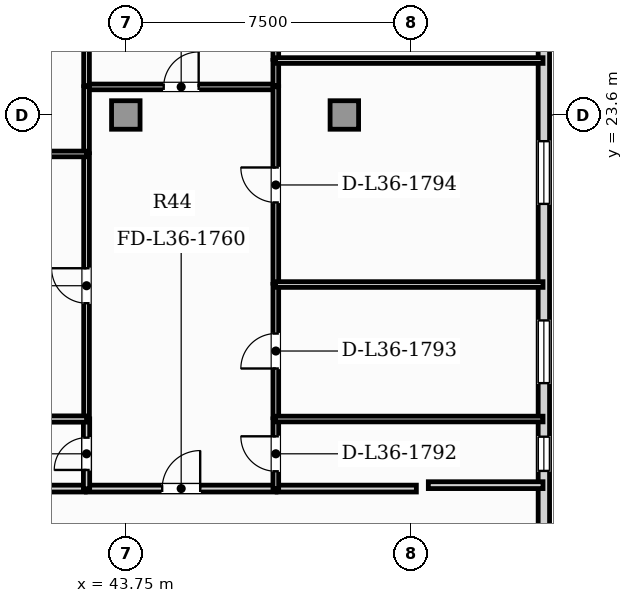
"""IFC4 building model, lengths in metres.
Left out: names, types, materials, properties, quantities, classifications, styles, units other than length and angle.
Written with IfcOpenShell. Run it as: python <this file> out.ifc"""

import sys

from ifc_helpers import new_model, si_unit, direction, frame, frame_2d, origin, origin_2d, place, context, subcontext, project, spatial, rectangle, extrude, element, fill, save


model = new_model("IFC4")
c1 = context("Model", 3, precision=1e-05, world=origin(), true_north=direction((0.0, 1.0)))
c2 = subcontext(c1, "Body", "Model", "MODEL_VIEW")
j1 = project(units=[si_unit("LENGTHUNIT", "METRE"), si_unit("PLANEANGLEUNIT", "RADIAN")], contexts=[c1])
p1 = place(None, origin())
s1 = spatial("IfcSite", under=j1, at=p1, CompositionType="ELEMENT")
p2 = place(p1, origin())
s2 = spatial("IfcBuilding", under=s1, at=p2, CompositionType="ELEMENT")
p3 = place(p2, frame((0.0, 0.0, 149.05)))
s3 = spatial("IfcBuildingStorey", under=s2, at=p3, CompositionType="ELEMENT", Elevation=149.05)
for number, where, z_axis, x_axis in (
    (1, (43.75, 23.6, 0.0), (0.0, 0.0, 1.0), (1.0, 0.0, 0.0)),
    (2, (49.5, 23.6, 0.0), (0.0, 0.0, 1.0), (1.0, 0.0, 0.0)),
):
    element("IfcColumn", number, at=place(p3, frame(where, z_axis=z_axis, x_axis=x_axis)), inside=s3, PredefinedType="COLUMN", context=c2, shape_type="SweptSolid", body=[
        extrude(rectangle(XDim=0.75, YDim=0.75, at=origin_2d()), origin(), (0.0, 0.0, 1.0), 3.85),
    ])
p4 = place(p3, frame((54.75, 3.24, 0.0), z_axis=(0.0, 0.0, 1.0), x_axis=(0.0, 1.0, 0.0)))
e3 = element("IfcWall", 3, at=p4, inside=s3, PredefinedType="SOLIDWALL", context=c2, shape_type="SweptSolid", body=[
    extrude(rectangle(XDim=36.72, YDim=0.3, at=frame_2d((18.36, 0.0))), origin(), (0.0, 0.0, 1.0), 3.63),
])
p5 = place(p4, frame((30.56, 0.0, 0.95)))
e4 = element("IfcOpeningElement", 4, at=p5, cuts=e3, PredefinedType="OPENING", context=c2, shape_type="SweptSolid", body=[
    extrude(rectangle(XDim=0.9, YDim=1.5, at=frame_2d((0.45, 0.75))), frame((0.0, 0.16, 0.0), z_axis=(0.0, -1.0, 0.0), x_axis=(1.0, 0.0, 0.0)), (0.0, 0.0, 1.0), 0.32),
])
p6 = place(p4, frame((10.995, 0.0, 0.95)))
e5 = element("IfcOpeningElement", 5, at=p6, cuts=e3, PredefinedType="OPENING", context=c2, shape_type="SweptSolid", body=[
    extrude(rectangle(XDim=0.9, YDim=1.5, at=frame_2d((0.45, 0.75))), frame((0.0, 0.16, 0.0), z_axis=(0.0, -1.0, 0.0), x_axis=(1.0, 0.0, 0.0)), (0.0, 0.0, 1.0), 0.32),
])
p7 = place(p4, frame((13.304, 0.0, 0.88)))
e6 = element("IfcOpeningElement", 6, at=p7, cuts=e3, PredefinedType="OPENING", context=c2, shape_type="SweptSolid", body=[
    extrude(rectangle(XDim=1.65, YDim=2.0, at=frame_2d((0.825, 1.0))), frame((0.0, 0.16, 0.0), z_axis=(0.0, -1.0, 0.0), x_axis=(1.0, 0.0, 0.0)), (0.0, 0.0, 1.0), 0.32),
])
p8 = place(p4, frame((18.021, 0.0, 0.88)))
e7 = element("IfcOpeningElement", 7, at=p8, cuts=e3, PredefinedType="OPENING", context=c2, shape_type="SweptSolid", body=[
    extrude(rectangle(XDim=1.65, YDim=2.0, at=frame_2d((0.825, 1.0))), frame((0.0, 0.16, 0.0), z_axis=(0.0, -1.0, 0.0), x_axis=(1.0, 0.0, 0.0)), (0.0, 0.0, 1.0), 0.32),
])
p9 = place(p4, frame((25.201, 0.0, 0.88)))
e8 = element("IfcOpeningElement", 8, at=p9, cuts=e3, PredefinedType="OPENING", context=c2, shape_type="SweptSolid", body=[
    extrude(rectangle(XDim=1.65, YDim=2.0, at=frame_2d((0.825, 1.0))), frame((0.0, 0.16, 0.0), z_axis=(0.0, -1.0, 0.0), x_axis=(1.0, 0.0, 0.0)), (0.0, 0.0, 1.0), 0.32),
])
p10 = place(p4, frame((32.759, 0.0, 0.88)))
e9 = element("IfcOpeningElement", 9, at=p10, cuts=e3, PredefinedType="OPENING", context=c2, shape_type="SweptSolid", body=[
    extrude(rectangle(XDim=1.65, YDim=2.0, at=frame_2d((0.825, 1.0))), frame((0.0, 0.16, 0.0), z_axis=(0.0, -1.0, 0.0), x_axis=(1.0, 0.0, 0.0)), (0.0, 0.0, 1.0), 0.32),
])
p11 = place(p3, frame((42.712, 13.77, 0.0), z_axis=(0.0, 0.0, 1.0), x_axis=(1.0, 0.0, 0.0)))
e10 = element("IfcWall", 10, at=p11, inside=s3, PredefinedType="PARTITIONING", context=c2, shape_type="SweptSolid", body=[
    extrude(rectangle(XDim=4.99, YDim=0.18, at=frame_2d((2.495, 0.0))), origin(), (0.0, 0.0, 1.0), 3.63),
])
p12 = place(p11, frame((1.995, 0.0, 0.0)))
e11 = element("IfcOpeningElement", 11, at=p12, cuts=e10, PredefinedType="OPENING", context=c2, shape_type="SweptSolid", body=[
    extrude(rectangle(XDim=1.0, YDim=2.15, at=frame_2d((0.5, 1.075))), frame((0.0, 0.1, 0.0), z_axis=(0.0, -1.0, 0.0), x_axis=(1.0, 0.0, 0.0)), (0.0, 0.0, 1.0), 0.2),
])
p13 = place(p3, frame((36.379, 13.77, 0.0), z_axis=(0.0, 0.0, 1.0), x_axis=(1.0, 0.0, 0.0)))
e12 = element("IfcWall", 12, at=p13, inside=s3, PredefinedType="PARTITIONING", context=c2, shape_type="SweptSolid", body=[
    extrude(rectangle(XDim=6.303, YDim=0.18, at=frame_2d((3.151, 0.0))), origin(), (0.0, 0.0, 1.0), 3.63),
])
p14 = place(p3, frame((47.732, 13.77, 0.0), z_axis=(0.0, 0.0, 1.0), x_axis=(1.0, 0.0, 0.0)))
e13 = element("IfcWall", 13, at=p14, inside=s3, PredefinedType="PARTITIONING", context=c2, shape_type="SweptSolid", body=[
    extrude(rectangle(XDim=3.663, YDim=0.18, at=frame_2d((1.832, 0.0))), origin(), (0.0, 0.0, 1.0), 3.63),
])
p15 = place(p3, frame((42.712, 24.338, 0.0), z_axis=(0.0, 0.0, 1.0), x_axis=(1.0, 0.0, 0.0)))
e14 = element("IfcWall", 14, at=p15, inside=s3, PredefinedType="PARTITIONING", context=c2, shape_type="SweptSolid", body=[
    extrude(rectangle(XDim=4.99, YDim=0.15, at=frame_2d((2.495, 0.0))), origin(), (0.0, 0.0, 1.0), 3.63),
])
p16 = place(p15, frame((2.035, 0.0, 0.0)))
e15 = element("IfcOpeningElement", 15, at=p16, cuts=e14, PredefinedType="OPENING", context=c2, shape_type="SweptSolid", body=[
    extrude(rectangle(XDim=0.92, YDim=2.1, at=frame_2d((0.46, 1.05))), frame((0.0, 0.085, 0.0), z_axis=(0.0, -1.0, 0.0), x_axis=(1.0, 0.0, 0.0)), (0.0, 0.0, 1.0), 0.17),
])
p17 = place(p3, frame((42.717, 13.765, 0.0), z_axis=(0.0, 0.0, 1.0), x_axis=(0.0, 1.0, 0.0)))
e16 = element("IfcWall", 16, at=p17, inside=s3, PredefinedType="PLUMBINGWALL", context=c2, shape_type="SweptSolid", body=[
    extrude(rectangle(XDim=1.84, YDim=0.165, at=frame_2d((0.92, 0.0))), origin(), (0.0, 0.0, 1.0), 3.63),
])
p18 = place(p17, frame((0.495, 0.0, 0.0)))
e17 = element("IfcOpeningElement", 17, at=p18, cuts=e16, PredefinedType="OPENING", context=c2, shape_type="SweptSolid", body=[
    extrude(rectangle(XDim=0.85, YDim=2.1, at=frame_2d((0.425, 1.05))), frame((0.0, 0.093, 0.0), z_axis=(0.0, -1.0, 0.0), x_axis=(1.0, 0.0, 0.0)), (0.0, 0.0, 1.0), 0.185),
])
p19 = place(p3, frame((42.717, 15.635, 0.0), z_axis=(0.0, 0.0, 1.0), x_axis=(0.0, 1.0, 0.0)))
e18 = element("IfcWall", 18, at=p19, inside=s3, PredefinedType="PARTITIONING", context=c2, shape_type="SweptSolid", body=[
    extrude(rectangle(XDim=6.945, YDim=0.15, at=frame_2d((3.472, 0.0))), origin(), (0.0, 0.0, 1.0), 3.63),
])
p20 = place(p19, frame((3.012, 0.0, 0.0)))
e19 = element("IfcOpeningElement", 19, at=p20, cuts=e18, PredefinedType="OPENING", context=c2, shape_type="SweptSolid", body=[
    extrude(rectangle(XDim=0.92, YDim=2.1, at=frame_2d((0.46, 1.05))), frame((0.0, 0.085, 0.0), z_axis=(0.0, -1.0, 0.0), x_axis=(1.0, 0.0, 0.0)), (0.0, 0.0, 1.0), 0.17),
])
p21 = place(p3, frame((42.717, 22.61, 0.0), z_axis=(0.0, 0.0, 1.0), x_axis=(0.0, 1.0, 0.0)))
e20 = element("IfcWall", 20, at=p21, inside=s3, PredefinedType="PARTITIONING", context=c2, shape_type="SweptSolid", body=[
    extrude(rectangle(XDim=1.734, YDim=0.15, at=frame_2d((0.867, 0.0))), origin(), (0.0, 0.0, 1.0), 3.63),
])
p22 = place(p3, frame((47.697, 13.765, 0.0), z_axis=(0.0, 0.0, 1.0), x_axis=(0.0, 1.0, 0.0)))
e21 = element("IfcWall", 21, at=p22, inside=s3, PredefinedType="PARTITIONING", context=c2, shape_type="SweptSolid", body=[
    extrude(rectangle(XDim=1.84, YDim=0.15, at=frame_2d((0.92, 0.0))), origin(), (0.0, 0.0, 1.0), 3.63),
])
p23 = place(p22, frame((0.46, 0.0, 0.0)))
e22 = element("IfcOpeningElement", 22, at=p23, cuts=e21, PredefinedType="OPENING", context=c2, shape_type="SweptSolid", body=[
    extrude(rectangle(XDim=0.92, YDim=2.1, at=frame_2d((0.46, 1.05))), frame((0.0, 0.085, 0.0), z_axis=(0.0, -1.0, 0.0), x_axis=(1.0, 0.0, 0.0)), (0.0, 0.0, 1.0), 0.17),
])
p24 = place(p3, frame((47.697, 15.635, 0.0), z_axis=(0.0, 0.0, 1.0), x_axis=(0.0, 1.0, 0.0)))
e23 = element("IfcWall", 23, at=p24, inside=s3, PredefinedType="PARTITIONING", context=c2, shape_type="SweptSolid", body=[
    extrude(rectangle(XDim=3.509, YDim=0.15, at=frame_2d((1.754, 0.0))), origin(), (0.0, 0.0, 1.0), 3.177),
])
p25 = place(p24, frame((1.294, 0.0, 0.0)))
e24 = element("IfcOpeningElement", 24, at=p25, cuts=e23, PredefinedType="OPENING", context=c2, shape_type="SweptSolid", body=[
    extrude(rectangle(XDim=0.92, YDim=2.1, at=frame_2d((0.46, 1.05))), frame((0.0, 0.085, 0.0), z_axis=(0.0, -1.0, 0.0), x_axis=(1.0, 0.0, 0.0)), (0.0, 0.0, 1.0), 0.17),
])
p26 = place(p3, frame((47.697, 19.174, 0.0), z_axis=(0.0, 0.0, 1.0), x_axis=(0.0, 1.0, 0.0)))
e25 = element("IfcWall", 25, at=p26, inside=s3, PredefinedType="PARTITIONING", context=c2, shape_type="SweptSolid", body=[
    extrude(rectangle(XDim=5.17, YDim=0.15, at=frame_2d((2.585, 0.0))), origin(), (0.0, 0.0, 1.0), 3.177),
])
p27 = place(p26, frame((2.125, 0.0, 0.0)))
e26 = element("IfcOpeningElement", 26, at=p27, cuts=e25, PredefinedType="OPENING", context=c2, shape_type="SweptSolid", body=[
    extrude(rectangle(XDim=0.92, YDim=2.1, at=frame_2d((0.46, 1.05))), frame((0.0, 0.085, 0.0), z_axis=(0.0, -1.0, 0.0), x_axis=(1.0, 0.0, 0.0)), (0.0, 0.0, 1.0), 0.17),
])
p28 = place(p3, frame((42.717, 24.374, 0.0), z_axis=(0.0, 0.0, 1.0), x_axis=(0.0, 1.0, 0.0)))
e27 = element("IfcWall", 27, at=p28, inside=s3, PredefinedType="PARTITIONING", context=c2, shape_type="SweptSolid", body=[
    extrude(rectangle(XDim=9.131, YDim=0.15, at=frame_2d((4.566, 0.0))), origin(), (0.0, 0.0, 1.0), 3.63),
])
p29 = place(p28, frame((5.476, 0.0, 0.0)))
e28 = element("IfcOpeningElement", 28, at=p29, cuts=e27, PredefinedType="OPENING", context=c2, shape_type="SweptSolid", body=[
    extrude(rectangle(XDim=0.92, YDim=2.1, at=frame_2d((0.46, 1.05))), frame((0.0, 0.085, 0.0), z_axis=(0.0, -1.0, 0.0), x_axis=(1.0, 0.0, 0.0)), (0.0, 0.0, 1.0), 0.17),
])
p30 = place(p3, frame((47.697, 24.374, 0.0), z_axis=(0.0, 0.0, 1.0), x_axis=(0.0, 1.0, 0.0)))
e29 = element("IfcWall", 29, at=p30, inside=s3, PredefinedType="PARTITIONING", context=c2, shape_type="SweptSolid", body=[
    extrude(rectangle(XDim=0.664, YDim=0.15, at=frame_2d((0.332, 0.0))), origin(), (0.0, 0.0, 1.0), 3.63),
])
p31 = place(p3, frame((47.697, 25.067, 0.0), z_axis=(0.0, 0.0, 1.0), x_axis=(0.0, 1.0, 0.0)))
e30 = element("IfcWall", 30, at=p31, inside=s3, PredefinedType="PARTITIONING", context=c2, shape_type="SweptSolid", body=[
    extrude(rectangle(XDim=8.438, YDim=0.15, at=frame_2d((4.219, 0.0))), origin(), (0.0, 0.0, 1.0), 3.177),
])
p32 = place(p31, frame((3.759, 0.0, 0.0)))
e31 = element("IfcOpeningElement", 31, at=p32, cuts=e30, PredefinedType="OPENING", context=c2, shape_type="SweptSolid", body=[
    extrude(rectangle(XDim=0.92, YDim=2.1, at=frame_2d((0.46, 1.05))), frame((0.0, 0.085, 0.0), z_axis=(0.0, -1.0, 0.0), x_axis=(1.0, 0.0, 0.0)), (0.0, 0.0, 1.0), 0.17),
])
p33 = place(p3, frame((36.379, 15.6, 0.0), z_axis=(0.0, 0.0, 1.0), x_axis=(1.0, 0.0, 0.0)))
e32 = element("IfcWall", 32, at=p33, inside=s3, PredefinedType="PLUMBINGWALL", context=c2, shape_type="SweptSolid", body=[
    extrude(rectangle(XDim=6.343, YDim=0.165, at=frame_2d((3.171, 0.0))), origin(), (0.0, 0.0, 1.0), 3.63),
])
p34 = place(p3, frame((36.339, 22.575, 0.0), z_axis=(0.0, 0.0, 1.0), x_axis=(1.0, 0.0, 0.0)))
e33 = element("IfcWall", 33, at=p34, inside=s3, PredefinedType="PARTITIONING", context=c2, shape_type="SweptSolid", body=[
    extrude(rectangle(XDim=6.383, YDim=0.15, at=frame_2d((3.191, 0.0))), origin(), (0.0, 0.0, 1.0), 3.63),
])
for number, where, z_axis, x_axis in (
    (34, (47.692, 15.6, 0.0), (0.0, 0.0, 1.0), (1.0, 0.0, 0.0)),
    (35, (47.692, 19.139, 0.0), (0.0, 0.0, 1.0), (1.0, 0.0, 0.0)),
    (36, (47.692, 25.032, 0.0), (0.0, 0.0, 1.0), (1.0, 0.0, 0.0)),
):
    element("IfcWall", number, at=place(p3, frame(where, z_axis=z_axis, x_axis=x_axis)), inside=s3, PredefinedType="PARTITIONING", context=c2, shape_type="SweptSolid", body=[
        extrude(rectangle(XDim=7.036, YDim=0.15, at=frame_2d((3.518, 0.0))), origin(), (0.0, 0.0, 1.0), 3.63),
    ])
p35 = place(p3, frame((54.728, 13.86, 0.0), z_axis=(0.0, 0.0, 1.0), x_axis=(-1.0, 0.0, 0.0)))
e37 = element("IfcWall", 37, at=p35, inside=s3, PredefinedType="PARTITIONING", context=c2, shape_type="SweptSolid", body=[
    extrude(rectangle(XDim=3.018, YDim=0.18, at=frame_2d((1.509, 0.0))), origin(), (0.0, 0.0, 1.0), 3.63),
])
p36 = place(p6, origin())
e38 = element("IfcWindow", 38, at=p36, inside=s3, PartitioningType="SINGLE_PANEL", PredefinedType="WINDOW", context=c2, shape_type="SweptSolid", body=[
    extrude(rectangle(XDim=0.9, YDim=1.5, at=frame_2d((0.45, 0.75))), frame((0.0, 0.03, 0.0), z_axis=(0.0, -1.0, 0.0), x_axis=(1.0, 0.0, 0.0)), (0.0, 0.0, 1.0), 0.06),
])
fill(e5, e38)
p37 = place(p7, origin())
e39 = element("IfcWindow", 39, at=p37, inside=s3, PartitioningType="SINGLE_PANEL", PredefinedType="WINDOW", context=c2, shape_type="SweptSolid", body=[
    extrude(rectangle(XDim=1.65, YDim=2.0, at=frame_2d((0.825, 1.0))), frame((0.0, 0.03, 0.0), z_axis=(0.0, -1.0, 0.0), x_axis=(1.0, 0.0, 0.0)), (0.0, 0.0, 1.0), 0.06),
])
fill(e6, e39)
p38 = place(p8, origin())
e40 = element("IfcWindow", 40, at=p38, inside=s3, PartitioningType="SINGLE_PANEL", PredefinedType="WINDOW", context=c2, shape_type="SweptSolid", body=[
    extrude(rectangle(XDim=1.65, YDim=2.0, at=frame_2d((0.825, 1.0))), frame((0.0, 0.03, 0.0), z_axis=(0.0, -1.0, 0.0), x_axis=(1.0, 0.0, 0.0)), (0.0, 0.0, 1.0), 0.06),
])
fill(e7, e40)
p39 = place(p12, origin())
e41 = element("IfcDoor", 41, at=p39, inside=s3, OperationType="SINGLE_SWING_RIGHT", PredefinedType="DOOR", context=c2, shape_type="SweptSolid", body=[
    extrude(rectangle(XDim=1.0, YDim=2.15, at=frame_2d((0.5, 1.075))), frame((0.0, 0.025, 0.0), z_axis=(0.0, -1.0, 0.0), x_axis=(1.0, 0.0, 0.0)), (0.0, 0.0, 1.0), 0.05),
])
fill(e11, e41)
p40 = place(p16, origin())
e42 = element("IfcDoor", 42, at=p40, inside=s3, OperationType="SINGLE_SWING_RIGHT", PredefinedType="DOOR", context=c2, shape_type="SweptSolid", body=[
    extrude(rectangle(XDim=0.92, YDim=2.1, at=frame_2d((0.46, 1.05))), frame((0.0, 0.025, 0.0), z_axis=(0.0, -1.0, 0.0), x_axis=(1.0, 0.0, 0.0)), (0.0, 0.0, 1.0), 0.05),
])
fill(e15, e42)
p41 = place(p18, origin())
e43 = element("IfcDoor", 43, at=p41, inside=s3, OperationType="SINGLE_SWING_LEFT", PredefinedType="DOOR", context=c2, shape_type="SweptSolid", body=[
    extrude(rectangle(XDim=0.85, YDim=2.1, at=frame_2d((0.425, 1.05))), frame((0.0, 0.025, 0.0), z_axis=(0.0, -1.0, 0.0), x_axis=(1.0, 0.0, 0.0)), (0.0, 0.0, 1.0), 0.05),
])
fill(e17, e43)
p42 = place(p20, origin())
e44 = element("IfcDoor", 44, at=p42, inside=s3, OperationType="SINGLE_SWING_RIGHT", PredefinedType="DOOR", context=c2, shape_type="SweptSolid", body=[
    extrude(rectangle(XDim=0.92, YDim=2.1, at=frame_2d((0.46, 1.05))), frame((0.0, 0.025, 0.0), z_axis=(0.0, -1.0, 0.0), x_axis=(1.0, 0.0, 0.0)), (0.0, 0.0, 1.0), 0.05),
])
fill(e19, e44)
p43 = place(p23, origin())
e45 = element("IfcDoor", 45, at=p43, inside=s3, OperationType="SINGLE_SWING_RIGHT", PredefinedType="DOOR", context=c2, shape_type="SweptSolid", body=[
    extrude(rectangle(XDim=0.92, YDim=2.1, at=frame_2d((0.46, 1.05))), frame((0.0, 0.025, 0.0), z_axis=(0.0, -1.0, 0.0), x_axis=(1.0, 0.0, 0.0)), (0.0, 0.0, 1.0), 0.05),
])
fill(e22, e45)
p44 = place(p25, origin())
e46 = element("IfcDoor", 46, at=p44, inside=s3, OperationType="SINGLE_SWING_LEFT", PredefinedType="DOOR", context=c2, shape_type="SweptSolid", body=[
    extrude(rectangle(XDim=0.92, YDim=2.1, at=frame_2d((0.46, 1.05))), frame((0.0, 0.025, 0.0), z_axis=(0.0, -1.0, 0.0), x_axis=(1.0, 0.0, 0.0)), (0.0, 0.0, 1.0), 0.05),
])
fill(e24, e46)
p45 = place(p27, origin())
e47 = element("IfcDoor", 47, at=p45, inside=s3, OperationType="SINGLE_SWING_RIGHT", PredefinedType="DOOR", context=c2, shape_type="SweptSolid", body=[
    extrude(rectangle(XDim=0.92, YDim=2.1, at=frame_2d((0.46, 1.05))), frame((0.0, 0.025, 0.0), z_axis=(0.0, -1.0, 0.0), x_axis=(1.0, 0.0, 0.0)), (0.0, 0.0, 1.0), 0.05),
])
fill(e26, e47)
save(model, sys.argv[1])
